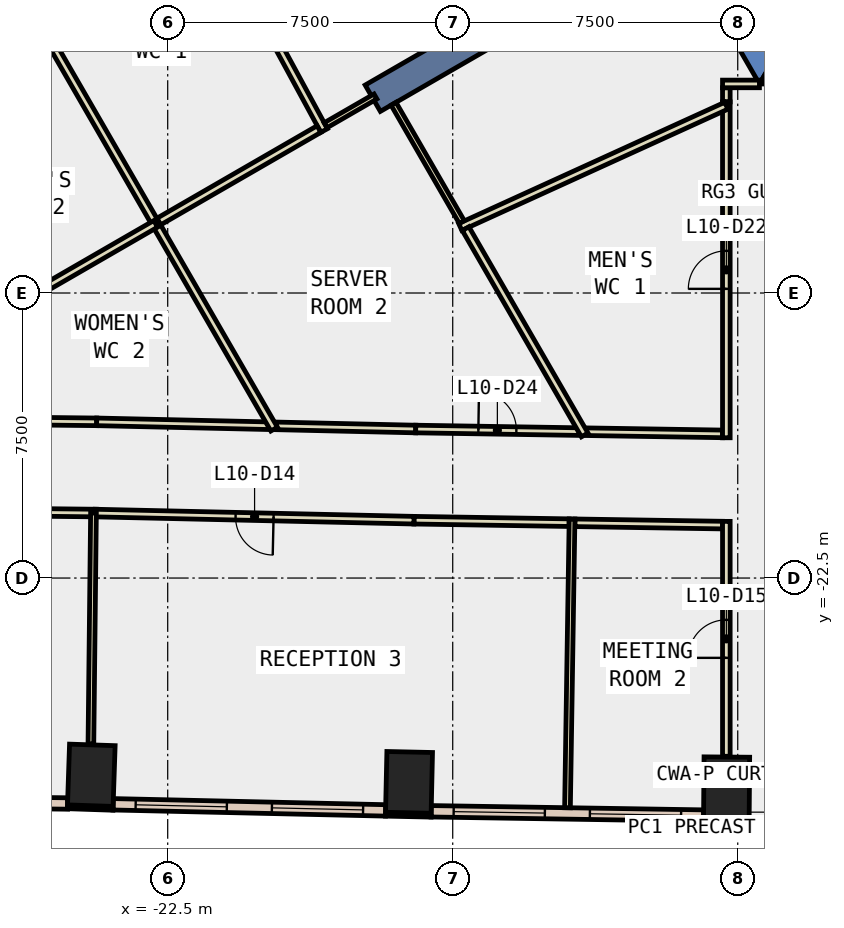
"""IFC4 building model, lengths in metres.
Left out: names, types, materials, properties, quantities, classifications, styles, units other than length and angle.
Written with IfcOpenShell. Run it as: python <this file> out.ifc"""

import sys

from ifc_helpers import new_model, si_unit, direction, frame, frame_2d, origin, origin_2d, place, context, subcontext, project, spatial, polyline, rectangle, outline, extrude, element, fill, save


model = new_model("IFC4")
c1 = context("Model", 3, precision=1e-05, world=origin(), true_north=direction((0.0, 1.0)))
c2 = subcontext(c1, "Body", "Model", "MODEL_VIEW")
j1 = project(units=[si_unit("LENGTHUNIT", "METRE"), si_unit("PLANEANGLEUNIT", "RADIAN")], contexts=[c1])
p1 = place(None, origin())
s1 = spatial("IfcSite", under=j1, at=p1, CompositionType="ELEMENT")
p2 = place(p1, origin())
s2 = spatial("IfcBuilding", under=s1, at=p2, CompositionType="ELEMENT")
p3 = place(p2, frame((0.0, 0.0, 51.8)))
s3 = spatial("IfcBuildingStorey", under=s2, at=p3, CompositionType="ELEMENT", Elevation=51.8)
for number, where, z_axis, x_axis in (
    (1, (-24.51, -27.69, -0.4), (0.0, 0.0, 1.0), (-0.999, 0.034, 0.0)),
    (2, (-16.15, -27.877, -0.4), (0.0, 0.0, 1.0), (-1.0, 0.022, 0.0)),
    (3, (-7.793, -28.01, -0.4), (0.0, 0.0, 1.0), (-1.0, 0.008, 0.0)),
):
    element("IfcColumn", number, at=place(p3, frame(where, z_axis=z_axis, x_axis=x_axis)), inside=s3, PredefinedType="COLUMN", context=c2, shape_type="SweptSolid", body=[
        extrude(rectangle(XDim=1.2, YDim=1.6, at=origin_2d()), origin(), (0.0, 0.0, 1.0), 4.2),
    ])
p4 = place(p3, frame((0.0, 0.0, -0.4)))
e4 = element("IfcWall", 4, at=p4, inside=s3, PredefinedType="SHEAR", context=c2, shape_type="SweptSolid", body=[
    extrude(outline(polyline([(-13.856, 2.5), (-6.928, -9.5), (-6.351, -8.5), (-12.702, 2.5), (-13.856, 2.5)])), origin(), (0.0, 0.0, 1.0), 4.2),
])
p5 = place(p3, frame((0.0, 0.0, -0.4)))
e5 = element("IfcWall", 5, at=p5, inside=s3, PredefinedType="SHEAR", context=c2, shape_type="SweptSolid", body=[
    extrude(outline(polyline([(3.75, -9.5), (3.75, -8.5), (-6.351, -8.5), (-6.928, -9.5), (3.75, -9.5)])), origin(), (0.0, 0.0, 1.0), 4.2),
])
p6 = place(p3, frame((-9.31, -5.375, -0.4), z_axis=(0.0, 0.0, 1.0), x_axis=(-0.866017533419, -0.500013631625, 0.0)))
e6 = element("IfcWall", 6, at=p6, inside=s3, PredefinedType="SHEAR", context=c2, shape_type="SweptSolid", body=[
    extrude(rectangle(XDim=9.0, YDim=0.8, at=frame_2d((4.5, 0.0))), origin(), (0.0, 0.0, 1.0), 4.2),
])
p7 = place(p3, frame((-25.138, -28.519, 0.0), z_axis=(0.0, 0.0, 1.0), x_axis=(0.999442872267, -0.03337581573, 0.0)))
e7 = element("IfcWall", 7, at=p7, inside=s3, PredefinedType="STANDARD", context=c2, shape_type="SweptSolid", body=[
    extrude(rectangle(XDim=1.2, YDim=0.1, at=frame_2d((0.6, 0.0))), origin(), (0.0, 0.0, 1.0), 3.8),
])
p8 = place(p3, frame((-16.769, -28.714, 0.0), z_axis=(0.0, 0.0, 1.0), x_axis=(0.99976752127, -0.021561618973, 0.0)))
e8 = element("IfcWall", 8, at=p8, inside=s3, PredefinedType="STANDARD", context=c2, shape_type="SweptSolid", body=[
    extrude(rectangle(XDim=1.2, YDim=0.1, at=frame_2d((0.6, 0.0))), origin(), (0.0, 0.0, 1.0), 3.8),
])
p9 = place(p3, frame((-8.4, -28.855, 0.0), z_axis=(0.0, 0.0, 1.0), x_axis=(0.999965208912, -0.008341520563, 0.0)))
e9 = element("IfcWall", 9, at=p9, inside=s3, PredefinedType="STANDARD", context=c2, shape_type="SweptSolid", body=[
    extrude(rectangle(XDim=1.2, YDim=0.1, at=frame_2d((0.6, 0.0))), origin(), (0.0, 0.0, 1.0), 3.8),
])
p10 = place(p3, frame((-32.279, -28.353, 0.0), z_axis=(0.0, 0.0, 1.0), x_axis=(0.999939101213, -0.011036025753, 0.0)))
e10 = element("IfcWall", 10, at=p10, inside=s3, PredefinedType="STANDARD", context=c2, shape_type="SweptSolid", body=[
    extrude(rectangle(XDim=7.146, YDim=0.3, at=frame_2d((3.573, 0.0))), origin(), (0.0, 0.0, 1.0), 3.8),
])
p11 = place(p10, frame((0.586, 0.0, 0.9)))
e11 = element("IfcOpeningElement", 11, at=p11, cuts=e10, PredefinedType="OPENING", context=c2, shape_type="SweptSolid", body=[
    extrude(rectangle(XDim=2.4, YDim=2.6, at=frame_2d((1.2, 1.3))), frame((0.0, 0.16, 0.0), z_axis=(0.0, -1.0, 0.0), x_axis=(1.0, 0.0, 0.0)), (0.0, 0.0, 1.0), 0.32),
])
p12 = place(p10, frame((4.159, 0.0, 0.9)))
e12 = element("IfcOpeningElement", 12, at=p12, cuts=e10, PredefinedType="OPENING", context=c2, shape_type="SweptSolid", body=[
    extrude(rectangle(XDim=2.4, YDim=2.6, at=frame_2d((1.2, 1.3))), frame((0.0, 0.16, 0.0), z_axis=(0.0, -1.0, 0.0), x_axis=(1.0, 0.0, 0.0)), (0.0, 0.0, 1.0), 0.32),
])
p13 = place(p3, frame((-23.936, -28.453, 0.0), z_axis=(0.0, 0.0, 1.0), x_axis=(0.999747567852, -0.022467767461, 0.0)))
e13 = element("IfcWall", 13, at=p13, inside=s3, PredefinedType="STANDARD", context=c2, shape_type="SweptSolid", body=[
    extrude(rectangle(XDim=7.172, YDim=0.3, at=frame_2d((3.586, 0.0))), origin(), (0.0, 0.0, 1.0), 3.8),
])
p14 = place(p13, frame((0.593, 0.0, 0.9)))
e14 = element("IfcOpeningElement", 14, at=p14, cuts=e13, PredefinedType="OPENING", context=c2, shape_type="SweptSolid", body=[
    extrude(rectangle(XDim=2.4, YDim=2.6, at=frame_2d((1.2, 1.3))), frame((0.0, 0.16, 0.0), z_axis=(0.0, -1.0, 0.0), x_axis=(1.0, 0.0, 0.0)), (0.0, 0.0, 1.0), 0.32),
])
p15 = place(p13, frame((4.179, 0.0, 0.9)))
e15 = element("IfcOpeningElement", 15, at=p15, cuts=e13, PredefinedType="OPENING", context=c2, shape_type="SweptSolid", body=[
    extrude(rectangle(XDim=2.4, YDim=2.6, at=frame_2d((1.2, 1.3))), frame((0.0, 0.16, 0.0), z_axis=(0.0, -1.0, 0.0), x_axis=(1.0, 0.0, 0.0)), (0.0, 0.0, 1.0), 0.32),
])
p16 = place(p3, frame((-15.568, -28.637, 0.0), z_axis=(0.0, 0.0, 1.0), x_axis=(0.999875756772, -0.015762963512, 0.0)))
e16 = element("IfcWall", 16, at=p16, inside=s3, PredefinedType="STANDARD", context=c2, shape_type="SweptSolid", body=[
    extrude(rectangle(XDim=7.171, YDim=0.3, at=frame_2d((3.585, 0.0))), origin(), (0.0, 0.0, 1.0), 3.8),
])
p17 = place(p16, frame((0.593, 0.0, 0.9)))
e17 = element("IfcOpeningElement", 17, at=p17, cuts=e16, PredefinedType="OPENING", context=c2, shape_type="SweptSolid", body=[
    extrude(rectangle(XDim=2.4, YDim=2.6, at=frame_2d((1.2, 1.3))), frame((0.0, 0.16, 0.0), z_axis=(0.0, -1.0, 0.0), x_axis=(1.0, 0.0, 0.0)), (0.0, 0.0, 1.0), 0.32),
])
p18 = place(p16, frame((4.178, 0.0, 0.9)))
e18 = element("IfcOpeningElement", 18, at=p18, cuts=e16, PredefinedType="OPENING", context=c2, shape_type="SweptSolid", body=[
    extrude(rectangle(XDim=2.4, YDim=2.6, at=frame_2d((1.2, 1.3))), frame((0.0, 0.16, 0.0), z_axis=(0.0, -1.0, 0.0), x_axis=(1.0, 0.0, 0.0)), (0.0, 0.0, 1.0), 0.32),
])
p19 = place(p3, frame((-11.477, -18.65, 0.0), z_axis=(0.0, 0.0, 1.0), x_axis=(0.9998724957, -0.015968479661, 0.0)))
e19 = element("IfcWall", 19, at=p19, inside=s3, PredefinedType="PARTITIONING", context=c2, shape_type="SweptSolid", body=[
    extrude(rectangle(XDim=3.578, YDim=0.2, at=frame_2d((1.789, 0.0))), origin(), (0.0, 0.0, 1.0), 3.8),
])
p20 = place(p3, frame((-19.649, -18.496, 0.0), z_axis=(0.0, 0.0, 1.0), x_axis=(0.999744980574, -0.02258259988, 0.0)))
e20 = element("IfcWall", 20, at=p20, inside=s3, PredefinedType="PARTITIONING", context=c2, shape_type="SweptSolid", body=[
    extrude(rectangle(XDim=3.676, YDim=0.2, at=frame_2d((1.838, 0.0))), origin(), (0.0, 0.0, 1.0), 3.8),
])
p21 = place(p3, frame((-15.974, -18.579, 0.0), z_axis=(0.0, 0.0, 1.0), x_axis=(0.999875289316, -0.015792587377, 0.0)))
e21 = element("IfcWall", 21, at=p21, inside=s3, PredefinedType="PARTITIONING", context=c2, shape_type="SweptSolid", body=[
    extrude(rectangle(XDim=4.298, YDim=0.2, at=frame_2d((2.149, 0.0))), origin(), (0.0, 0.0, 1.0), 3.8),
])
p22 = place(p21, frame((1.649, 0.0, 0.0)))
e22 = element("IfcOpeningElement", 22, at=p22, cuts=e21, PredefinedType="OPENING", context=c2, shape_type="SweptSolid", body=[
    extrude(rectangle(XDim=1.0, YDim=2.1, at=frame_2d((0.5, 1.05))), frame((0.0, 0.11, 0.0), z_axis=(0.0, -1.0, 0.0), x_axis=(1.0, 0.0, 0.0)), (0.0, 0.0, 1.0), 0.22),
])
p23 = place(p3, frame((-31.431, -18.312, 0.0), z_axis=(0.0, 0.0, 1.0), x_axis=(0.999939195602, -0.011027470214, 0.0)))
e23 = element("IfcWall", 23, at=p23, inside=s3, PredefinedType="PARTITIONING", context=c2, shape_type="SweptSolid", body=[
    extrude(rectangle(XDim=7.062, YDim=0.2, at=frame_2d((3.531, 0.0))), origin(), (0.0, 0.0, 1.0), 3.8),
])
p24 = place(p23, frame((3.031, 0.0, 0.0)))
e24 = element("IfcOpeningElement", 24, at=p24, cuts=e23, PredefinedType="OPENING", context=c2, shape_type="SweptSolid", body=[
    extrude(rectangle(XDim=1.0, YDim=2.1, at=frame_2d((0.5, 1.05))), frame((0.0, 0.11, 0.0), z_axis=(0.0, -1.0, 0.0), x_axis=(1.0, 0.0, 0.0)), (0.0, 0.0, 1.0), 0.22),
])
p25 = place(p3, frame((-24.369, -18.39, 0.0), z_axis=(0.0, 0.0, 1.0), x_axis=(0.99974519793, -0.022572975354, 0.0)))
e25 = element("IfcWall", 25, at=p25, inside=s3, PredefinedType="PARTITIONING", context=c2, shape_type="SweptSolid", body=[
    extrude(rectangle(XDim=4.521, YDim=0.2, at=frame_2d((2.26, 0.0))), origin(), (0.0, 0.0, 1.0), 3.8),
])
p26 = place(p3, frame((-24.378, -20.79, 0.0), z_axis=(0.0, 0.0, 1.0), x_axis=(-0.99993897746, 0.011047232974, 0.0)))
e26 = element("IfcWall", 26, at=p26, inside=s3, PredefinedType="PARTITIONING", context=c2, shape_type="SweptSolid", body=[
    extrude(rectangle(XDim=7.426, YDim=0.2, at=frame_2d((3.713, 0.0))), origin(), (0.0, 0.0, 1.0), 3.8),
])
p27 = place(p3, frame((-11.936, -21.043, 0.0), z_axis=(0.0, 0.0, 1.0), x_axis=(-0.999873595398, 0.015899472524, 0.0)))
e27 = element("IfcWall", 27, at=p27, inside=s3, PredefinedType="PARTITIONING", context=c2, shape_type="SweptSolid", body=[
    extrude(rectangle(XDim=4.084, YDim=0.2, at=frame_2d((2.042, 0.0))), origin(), (0.0, 0.0, 1.0), 3.8),
])
p28 = place(p3, frame((-16.02, -20.978, 0.0), z_axis=(0.0, 0.0, 1.0), x_axis=(-0.999749010047, 0.02240350216, 0.0)))
e28 = element("IfcWall", 28, at=p28, inside=s3, PredefinedType="PARTITIONING", context=c2, shape_type="SweptSolid", body=[
    extrude(rectangle(XDim=8.391, YDim=0.2, at=frame_2d((4.196, 0.0))), origin(), (0.0, 0.0, 1.0), 3.8),
])
p29 = place(p28, frame((3.695, 0.0, 0.0)))
e29 = element("IfcOpeningElement", 29, at=p29, cuts=e28, PredefinedType="OPENING", context=c2, shape_type="SweptSolid", body=[
    extrude(rectangle(XDim=1.0, YDim=2.1, at=frame_2d((0.5, 1.05))), frame((0.0, 0.11, 0.0), z_axis=(0.0, -1.0, 0.0), x_axis=(1.0, 0.0, 0.0)), (0.0, 0.0, 1.0), 0.22),
])
p30 = place(p3, frame((-7.9, -21.107, 0.0), z_axis=(0.0, 0.0, 1.0), x_axis=(-0.999876676102, 0.015704540367, 0.0)))
e30 = element("IfcWall", 30, at=p30, inside=s3, PredefinedType="PARTITIONING", context=c2, shape_type="SweptSolid", body=[
    extrude(rectangle(XDim=3.886, YDim=0.2, at=frame_2d((1.943, 0.0))), origin(), (0.0, 0.0, 1.0), 3.8),
])
p31 = place(p3, frame((-7.8, -9.972, 0.0), z_axis=(0.0, 0.0, 1.0), x_axis=(0.0, 1.0, 0.0)))
e31 = element("IfcWall", 31, at=p31, inside=s3, PredefinedType="PARTITIONING", context=c2, shape_type="SweptSolid", body=[
    extrude(rectangle(XDim=0.373, YDim=0.2, at=frame_2d((0.187, 0.0))), origin(), (0.0, 0.0, 1.0), 3.8),
])
p32 = place(p3, frame((-7.9, -9.499, 0.0), z_axis=(0.0, 0.0, 1.0), x_axis=(1.0, 0.0, 0.0)))
e32 = element("IfcWall", 32, at=p32, inside=s3, PredefinedType="PARTITIONING", context=c2, shape_type="SweptSolid", body=[
    extrude(rectangle(XDim=0.971, YDim=0.2, at=frame_2d((0.485, 0.0))), origin(), (0.0, 0.0, 1.0), 3.8),
])
p33 = place(p3, frame((-7.8, -18.809, 0.0), z_axis=(0.0, 0.0, 1.0), x_axis=(0.0, 1.0, 0.0)))
e33 = element("IfcWall", 33, at=p33, inside=s3, PredefinedType="PARTITIONING", context=c2, shape_type="SweptSolid", body=[
    extrude(rectangle(XDim=8.837, YDim=0.2, at=frame_2d((4.418, 0.0))), origin(), (0.0, 0.0, 1.0), 3.8),
])
p34 = place(p33, frame((3.918, 0.0, 0.0)))
e34 = element("IfcOpeningElement", 34, at=p34, cuts=e33, PredefinedType="OPENING", context=c2, shape_type="SweptSolid", body=[
    extrude(rectangle(XDim=1.0, YDim=2.1, at=frame_2d((0.5, 1.05))), frame((0.0, 0.11, 0.0), z_axis=(0.0, -1.0, 0.0), x_axis=(1.0, 0.0, 0.0)), (0.0, 0.0, 1.0), 0.22),
])
p35 = place(p3, frame((-7.8, -27.19, 0.0), z_axis=(0.0, 0.0, 1.0), x_axis=(0.0, 1.0, 0.0)))
e35 = element("IfcWall", 35, at=p35, inside=s3, PredefinedType="PARTITIONING", context=c2, shape_type="SweptSolid", body=[
    extrude(rectangle(XDim=6.181, YDim=0.2, at=frame_2d((3.09, 0.0))), origin(), (0.0, 0.0, 1.0), 3.8),
])
p36 = place(p35, frame((2.59, 0.0, 0.0)))
e36 = element("IfcOpeningElement", 36, at=p36, cuts=e35, PredefinedType="OPENING", context=c2, shape_type="SweptSolid", body=[
    extrude(rectangle(XDim=1.0, YDim=2.1, at=frame_2d((0.5, 1.05))), frame((0.0, 0.11, 0.0), z_axis=(0.0, -1.0, 0.0), x_axis=(1.0, 0.0, 0.0)), (0.0, 0.0, 1.0), 0.22),
])
p37 = place(p3, frame((-7.8, -10.072, 0.0), z_axis=(0.0, 0.0, 1.0), x_axis=(-0.910011899741, -0.414582129777, 0.0)))
e37 = element("IfcWall", 37, at=p37, inside=s3, PredefinedType="PARTITIONING", context=c2, shape_type="SweptSolid", body=[
    extrude(rectangle(XDim=7.694, YDim=0.2, at=frame_2d((3.847, 0.0))), origin(), (0.0, 0.0, 1.0), 3.8),
])
p38 = place(p3, frame((-18.384, -10.725, 0.0), z_axis=(0.0, 0.0, 1.0), x_axis=(-0.477137547132, 0.878828630119, 0.0)))
e38 = element("IfcWall", 38, at=p38, inside=s3, PredefinedType="PARTITIONING", context=c2, shape_type="SweptSolid", body=[
    extrude(rectangle(XDim=9.552, YDim=0.2, at=frame_2d((4.776, 0.0))), origin(), (0.0, 0.0, 1.0), 3.8),
])
p39 = place(p3, frame((-14.761, -13.134, 0.0), z_axis=(0.0, 0.0, 1.0), x_axis=(-0.499704810774, 0.866195764299, 0.0)))
e39 = element("IfcWall", 39, at=p39, inside=s3, PredefinedType="PARTITIONING", context=c2, shape_type="SweptSolid", body=[
    extrude(rectangle(XDim=3.594, YDim=0.15, at=frame_2d((1.797, 0.0))), origin(), (0.0, 0.0, 1.0), 3.8),
])
p40 = place(p3, frame((-17.033, -9.829, 0.0), z_axis=(0.0, 0.0, 1.0), x_axis=(-0.866094414679, -0.49988045057, 0.0)))
e40 = element("IfcWall", 40, at=p40, inside=s3, PredefinedType="PARTITIONING", context=c2, shape_type="SweptSolid", body=[
    extrude(rectangle(XDim=1.516, YDim=0.15, at=frame_2d((0.758, 0.0))), origin(), (0.0, 0.0, 1.0), 3.8),
])
p41 = place(p3, frame((-11.527, -18.735, 0.0), z_axis=(0.0, 0.0, 1.0), x_axis=(-0.499976457224, 0.866038995786, 0.0)))
e41 = element("IfcWall", 41, at=p41, inside=s3, PredefinedType="PARTITIONING", context=c2, shape_type="SweptSolid", body=[
    extrude(rectangle(XDim=6.268, YDim=0.2, at=frame_2d((3.134, 0.0))), origin(), (0.0, 0.0, 1.0), 3.8),
])
p42 = place(p3, frame((-18.519, -10.687, 0.0), z_axis=(0.0, 0.0, 1.0), x_axis=(-0.866063668779, -0.499933717229, 0.0)))
e42 = element("IfcWall", 42, at=p42, inside=s3, PredefinedType="PARTITIONING", context=c2, shape_type="SweptSolid", body=[
    extrude(rectangle(XDim=4.969, YDim=0.2, at=frame_2d((2.484, 0.0))), origin(), (0.0, 0.0, 1.0), 3.8),
])
p43 = place(p3, frame((-22.822, -13.171, 0.0), z_axis=(0.0, 0.0, 1.0), x_axis=(-0.499974913987, 0.866039886717, 0.0)))
e43 = element("IfcWall", 43, at=p43, inside=s3, PredefinedType="PARTITIONING", context=c2, shape_type="SweptSolid", body=[
    extrude(rectangle(XDim=6.222, YDim=0.2, at=frame_2d((3.111, 0.0))), origin(), (0.0, 0.0, 1.0), 3.8),
])
p44 = place(p3, frame((-19.699, -18.581, 0.0), z_axis=(0.0, 0.0, 1.0), x_axis=(-0.499899838407, 0.866083224385, 0.0)))
e44 = element("IfcWall", 44, at=p44, inside=s3, PredefinedType="PARTITIONING", context=c2, shape_type="SweptSolid", body=[
    extrude(rectangle(XDim=6.235, YDim=0.2, at=frame_2d((3.118, 0.0))), origin(), (0.0, 0.0, 1.0), 3.8),
])
p45 = place(p3, frame((-22.816, -13.181, 0.0), z_axis=(0.0, 0.0, 1.0), x_axis=(-0.86601529143, -0.500017514703, 0.0)))
e45 = element("IfcWall", 45, at=p45, inside=s3, PredefinedType="PARTITIONING", context=c2, shape_type="SweptSolid", body=[
    extrude(rectangle(XDim=9.932, YDim=0.2, at=frame_2d((4.966, 0.0))), origin(), (0.0, 0.0, 1.0), 3.8),
])
p46 = place(p3, frame((-24.453, -20.79, 0.0), z_axis=(0.0, 0.0, 1.0), x_axis=(-0.011204565898, -0.999937226881, 0.0)))
e46 = element("IfcWall", 46, at=p46, inside=s3, PredefinedType="PARTITIONING", context=c2, shape_type="SweptSolid", body=[
    extrude(rectangle(XDim=6.079, YDim=0.15, at=frame_2d((3.04, 0.0))), origin(), (0.0, 0.0, 1.0), 3.8),
])
p47 = place(p3, frame((-11.86, -20.945, 0.0), z_axis=(0.0, 0.0, 1.0), x_axis=(-0.015773137921, -0.999875596322, 0.0)))
e47 = element("IfcWall", 47, at=p47, inside=s3, PredefinedType="PARTITIONING", context=c2, shape_type="SweptSolid", body=[
    extrude(rectangle(XDim=7.6, YDim=0.15, at=frame_2d((3.8, 0.0))), origin(), (0.0, 0.0, 1.0), 3.8),
])
p48 = place(p14, origin())
e48 = element("IfcWindow", 48, at=p48, inside=s3, PartitioningType="SINGLE_PANEL", PredefinedType="WINDOW", context=c2, shape_type="SweptSolid", body=[
    extrude(rectangle(XDim=2.4, YDim=2.6, at=frame_2d((1.2, 1.3))), frame((0.0, 0.03, 0.0), z_axis=(0.0, -1.0, 0.0), x_axis=(1.0, 0.0, 0.0)), (0.0, 0.0, 1.0), 0.06),
])
fill(e14, e48)
p49 = place(p15, origin())
e49 = element("IfcWindow", 49, at=p49, inside=s3, PartitioningType="SINGLE_PANEL", PredefinedType="WINDOW", context=c2, shape_type="SweptSolid", body=[
    extrude(rectangle(XDim=2.4, YDim=2.6, at=frame_2d((1.2, 1.3))), frame((0.0, 0.03, 0.0), z_axis=(0.0, -1.0, 0.0), x_axis=(1.0, 0.0, 0.0)), (0.0, 0.0, 1.0), 0.06),
])
fill(e15, e49)
p50 = place(p17, origin())
e50 = element("IfcWindow", 50, at=p50, inside=s3, PartitioningType="SINGLE_PANEL", PredefinedType="WINDOW", context=c2, shape_type="SweptSolid", body=[
    extrude(rectangle(XDim=2.4, YDim=2.6, at=frame_2d((1.2, 1.3))), frame((0.0, 0.03, 0.0), z_axis=(0.0, -1.0, 0.0), x_axis=(1.0, 0.0, 0.0)), (0.0, 0.0, 1.0), 0.06),
])
fill(e17, e50)
p51 = place(p18, origin())
e51 = element("IfcWindow", 51, at=p51, inside=s3, PartitioningType="SINGLE_PANEL", PredefinedType="WINDOW", context=c2, shape_type="SweptSolid", body=[
    extrude(rectangle(XDim=2.4, YDim=2.6, at=frame_2d((1.2, 1.3))), frame((0.0, 0.03, 0.0), z_axis=(0.0, -1.0, 0.0), x_axis=(1.0, 0.0, 0.0)), (0.0, 0.0, 1.0), 0.06),
])
fill(e18, e51)
p52 = place(p29, origin())
e52 = element("IfcDoor", 52, at=p52, inside=s3, OperationType="SINGLE_SWING_RIGHT", PredefinedType="DOOR", context=c2, shape_type="SweptSolid", body=[
    extrude(rectangle(XDim=1.0, YDim=2.1, at=frame_2d((0.5, 1.05))), frame((0.0, 0.025, 0.0), z_axis=(0.0, -1.0, 0.0), x_axis=(1.0, 0.0, 0.0)), (0.0, 0.0, 1.0), 0.05),
])
fill(e29, e52)
p53 = place(p36, origin())
e53 = element("IfcDoor", 53, at=p53, inside=s3, OperationType="SINGLE_SWING_LEFT", PredefinedType="DOOR", context=c2, shape_type="SweptSolid", body=[
    extrude(rectangle(XDim=1.0, YDim=2.1, at=frame_2d((0.5, 1.05))), frame((0.0, 0.025, 0.0), z_axis=(0.0, -1.0, 0.0), x_axis=(1.0, 0.0, 0.0)), (0.0, 0.0, 1.0), 0.05),
])
fill(e36, e53)
p54 = place(p34, origin())
e54 = element("IfcDoor", 54, at=p54, inside=s3, OperationType="SINGLE_SWING_RIGHT", PredefinedType="DOOR", context=c2, shape_type="SweptSolid", body=[
    extrude(rectangle(XDim=1.0, YDim=2.1, at=frame_2d((0.5, 1.05))), frame((0.0, 0.025, 0.0), z_axis=(0.0, -1.0, 0.0), x_axis=(1.0, 0.0, 0.0)), (0.0, 0.0, 1.0), 0.05),
])
fill(e34, e54)
p55 = place(p22, origin())
e55 = element("IfcDoor", 55, at=p55, inside=s3, OperationType="SINGLE_SWING_LEFT", PredefinedType="DOOR", context=c2, shape_type="SweptSolid", body=[
    extrude(rectangle(XDim=1.0, YDim=2.1, at=frame_2d((0.5, 1.05))), frame((0.0, 0.025, 0.0), z_axis=(0.0, -1.0, 0.0), x_axis=(1.0, 0.0, 0.0)), (0.0, 0.0, 1.0), 0.05),
])
fill(e22, e55)
save(model, sys.argv[1])
